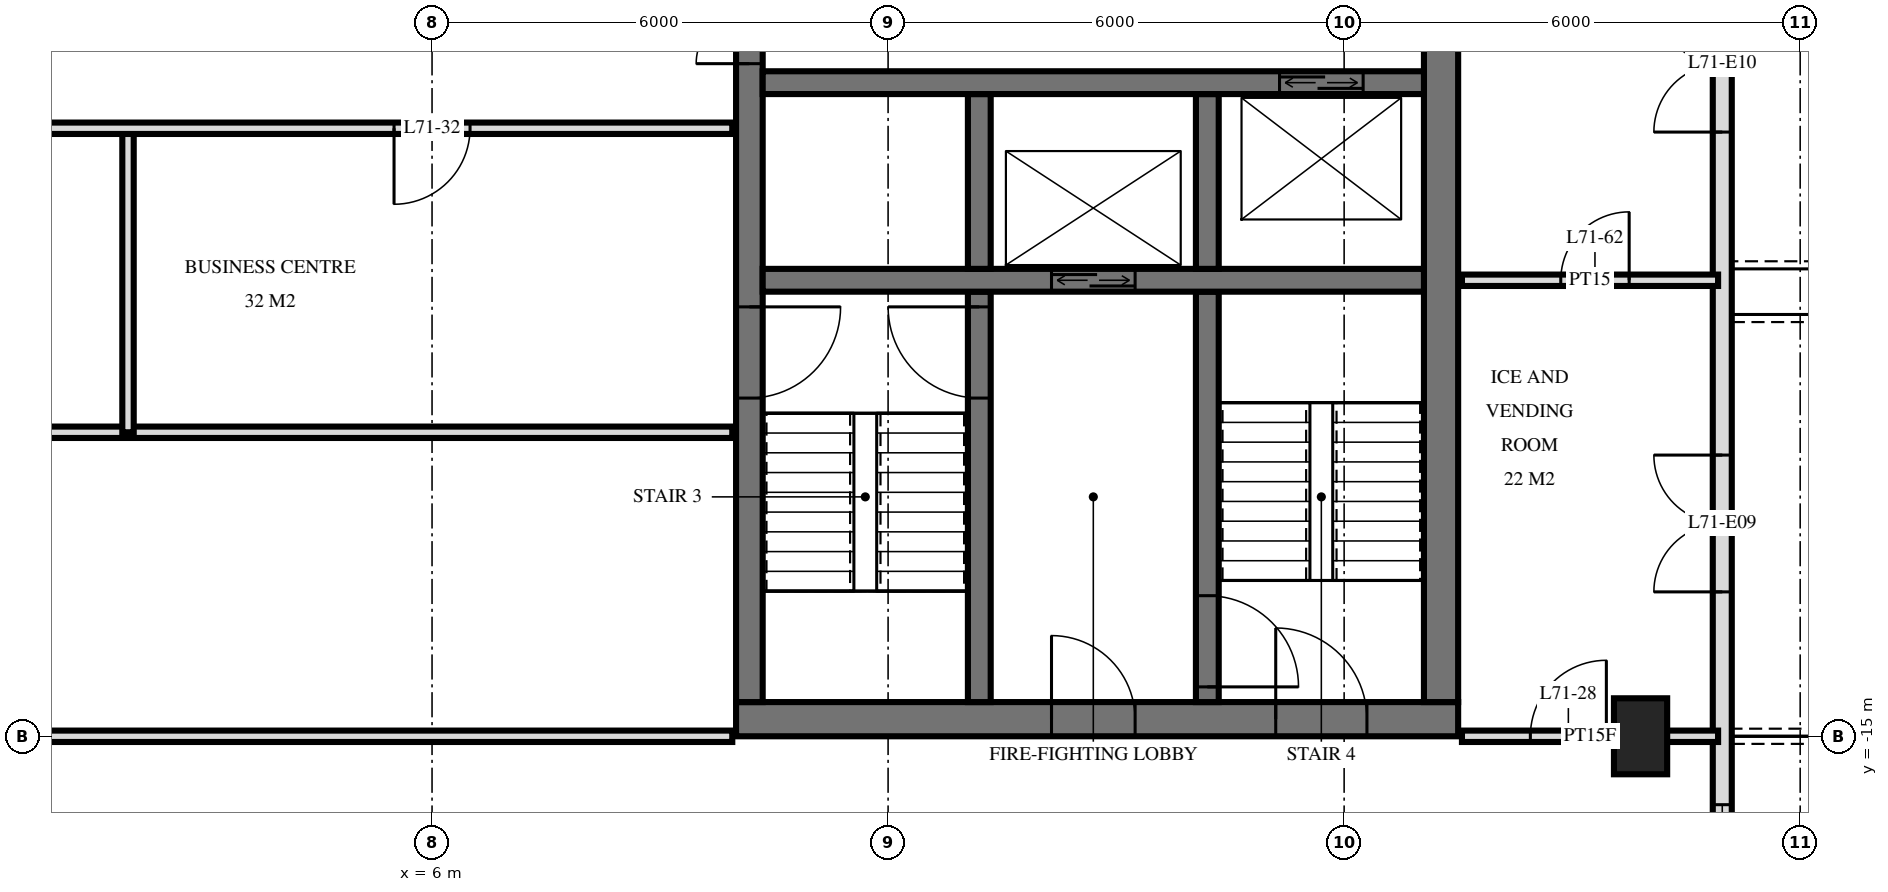
"""IFC4 building model, lengths in metres.
Left out: names, types, materials, properties, quantities, classifications, styles, units other than length and angle.
Written with IfcOpenShell. Run it as: python <this file> out.ifc"""

import sys

from ifc_helpers import new_model, si_unit, direction, frame, frame_2d, origin, origin_2d, place, context, subcontext, project, spatial, rectangle, extrude, element, fill, save


model = new_model("IFC4")
c1 = context("Model", 3, precision=1e-05, world=origin(), true_north=direction((0.0, 1.0)))
c2 = subcontext(c1, "Body", "Model", "MODEL_VIEW")
j1 = project(units=[si_unit("LENGTHUNIT", "METRE"), si_unit("PLANEANGLEUNIT", "RADIAN")], contexts=[c1])
p1 = place(None, origin())
s1 = spatial("IfcSite", under=j1, at=p1, CompositionType="ELEMENT")
p2 = place(p1, origin())
s2 = spatial("IfcBuilding", under=s1, at=p2, CompositionType="ELEMENT")
p3 = place(p2, frame((0.0, 0.0, 270.1)))
s3 = spatial("IfcBuildingStorey", under=s2, at=p3, CompositionType="ELEMENT", Elevation=270.1)
p4 = place(p3, frame((21.9, -15.0, 0.0), z_axis=(0.0, 0.0, 1.0), x_axis=(0.0, 1.0, 0.0)))
e1 = element("IfcColumn", 1, at=p4, inside=s3, PredefinedType="COLUMN", context=c2, shape_type="SweptSolid", body=[
    extrude(rectangle(XDim=1.0, YDim=0.7, at=origin_2d()), origin(), (0.0, 0.0, 1.0), 3.5),
])
p5 = place(p3, frame((10.0, -14.775, 0.0), z_axis=(0.0, 0.0, 1.0), x_axis=(1.0, 0.0, 0.0)))
e2 = element("IfcWall", 2, at=p5, inside=s3, PredefinedType="SHEAR", context=c2, shape_type="SweptSolid", body=[
    extrude(rectangle(XDim=9.5, YDim=0.45, at=frame_2d((4.75, 0.0))), origin(), (0.0, 0.0, 1.0), 3.5),
])
p6 = place(p5, frame((7.1, 0.0, 0.0)))
e3 = element("IfcOpeningElement", 3, at=p6, cuts=e2, PredefinedType="OPENING", context=c2, shape_type="SweptSolid", body=[
    extrude(rectangle(XDim=1.2, YDim=2.1, at=frame_2d((0.6, 1.05))), frame((0.0, 0.235, 0.0), z_axis=(0.0, -1.0, 0.0), x_axis=(1.0, 0.0, 0.0)), (0.0, 0.0, 1.0), 0.47),
])
p7 = place(p5, frame((4.15, 0.0, 0.0)))
e4 = element("IfcOpeningElement", 4, at=p7, cuts=e2, PredefinedType="OPENING", context=c2, shape_type="SweptSolid", body=[
    extrude(rectangle(XDim=1.1, YDim=2.1, at=frame_2d((0.55, 1.05))), frame((0.0, 0.235, 0.0), z_axis=(0.0, -1.0, 0.0), x_axis=(1.0, 0.0, 0.0)), (0.0, 0.0, 1.0), 0.47),
])
p8 = place(p3, frame((10.175, -14.55, 0.0), z_axis=(0.0, 0.0, 1.0), x_axis=(0.0, 1.0, 0.0)))
e5 = element("IfcWall", 5, at=p8, inside=s3, PredefinedType="SHEAR", context=c2, shape_type="SweptSolid", body=[
    extrude(rectangle(XDim=14.1, YDim=0.35, at=frame_2d((7.05, 0.0))), origin(), (0.0, 0.0, 1.0), 3.5),
])
p9 = place(p8, frame((8.4, 0.0, 0.0)))
e6 = element("IfcOpeningElement", 6, at=p9, cuts=e5, PredefinedType="OPENING", context=c2, shape_type="SweptSolid", body=[
    extrude(rectangle(XDim=1.4, YDim=2.4, at=frame_2d((0.7, 1.2))), frame((0.0, 0.185, 0.0), z_axis=(0.0, -1.0, 0.0), x_axis=(1.0, 0.0, 0.0)), (0.0, 0.0, 1.0), 0.37),
])
p10 = place(p8, frame((10.0, 0.0, 0.0)))
e7 = element("IfcOpeningElement", 7, at=p10, cuts=e5, PredefinedType="OPENING", context=c2, shape_type="SweptSolid", body=[
    extrude(rectangle(XDim=1.4, YDim=2.4, at=frame_2d((0.7, 1.2))), frame((0.0, 0.185, 0.0), z_axis=(0.0, -1.0, 0.0), x_axis=(1.0, 0.0, 0.0)), (0.0, 0.0, 1.0), 0.37),
])
p11 = place(p8, frame((4.0, 0.0, 0.0)))
e8 = element("IfcOpeningElement", 8, at=p11, cuts=e5, PredefinedType="OPENING", context=c2, shape_type="SweptSolid", body=[
    extrude(rectangle(XDim=1.2, YDim=2.1, at=frame_2d((0.6, 1.05))), frame((0.0, 0.185, 0.0), z_axis=(0.0, -1.0, 0.0), x_axis=(1.0, 0.0, 0.0)), (0.0, 0.0, 1.0), 0.37),
])
p12 = place(p3, frame((19.275, -14.55, 0.0), z_axis=(0.0, 0.0, 1.0), x_axis=(0.0, 1.0, 0.0)))
e9 = element("IfcWall", 9, at=p12, inside=s3, PredefinedType="SHEAR", context=c2, shape_type="SweptSolid", body=[
    extrude(rectangle(XDim=14.1, YDim=0.45, at=frame_2d((7.05, 0.0))), origin(), (0.0, 0.0, 1.0), 3.5),
])
p13 = place(p3, frame((10.35, -6.4, 0.0), z_axis=(0.0, 0.0, 1.0), x_axis=(1.0, 0.0, 0.0)))
e10 = element("IfcWall", 10, at=p13, inside=s3, PredefinedType="SHEAR", context=c2, shape_type="SweptSolid", body=[
    extrude(rectangle(XDim=8.7, YDim=0.3, at=frame_2d((4.35, 0.0))), origin(), (0.0, 0.0, 1.0), 3.5),
])
p14 = place(p13, frame((6.8, 0.0, 0.0)))
e11 = element("IfcOpeningElement", 11, at=p14, cuts=e10, PredefinedType="OPENING", context=c2, shape_type="SweptSolid", body=[
    extrude(rectangle(XDim=1.1, YDim=2.1, at=frame_2d((0.55, 1.05))), frame((0.0, 0.16, 0.0), z_axis=(0.0, -1.0, 0.0), x_axis=(1.0, 0.0, 0.0)), (0.0, 0.0, 1.0), 0.32),
])
p15 = place(p3, frame((10.35, -9.0, 0.0), z_axis=(0.0, 0.0, 1.0), x_axis=(1.0, 0.0, 0.0)))
e12 = element("IfcWall", 12, at=p15, inside=s3, PredefinedType="SHEAR", context=c2, shape_type="SweptSolid", body=[
    extrude(rectangle(XDim=8.7, YDim=0.3, at=frame_2d((4.35, 0.0))), origin(), (0.0, 0.0, 1.0), 3.5),
])
p16 = place(p15, frame((3.8, 0.0, 0.0)))
e13 = element("IfcOpeningElement", 13, at=p16, cuts=e12, PredefinedType="OPENING", context=c2, shape_type="SweptSolid", body=[
    extrude(rectangle(XDim=1.1, YDim=2.1, at=frame_2d((0.55, 1.05))), frame((0.0, 0.16, 0.0), z_axis=(0.0, -1.0, 0.0), x_axis=(1.0, 0.0, 0.0)), (0.0, 0.0, 1.0), 0.32),
])
p17 = place(p3, frame((13.2, -8.85, 0.0), z_axis=(0.0, 0.0, 1.0), x_axis=(0.0, 1.0, 0.0)))
e14 = element("IfcWall", 14, at=p17, inside=s3, PredefinedType="SHEAR", context=c2, shape_type="SweptSolid", body=[
    extrude(rectangle(XDim=2.3, YDim=0.3, at=frame_2d((1.15, 0.0))), origin(), (0.0, 0.0, 1.0), 3.5),
])
p18 = place(p3, frame((13.2, -14.55, 0.0), z_axis=(0.0, 0.0, 1.0), x_axis=(0.0, 1.0, 0.0)))
e15 = element("IfcWall", 15, at=p18, inside=s3, PredefinedType="SHEAR", context=c2, shape_type="SweptSolid", body=[
    extrude(rectangle(XDim=5.4, YDim=0.3, at=frame_2d((2.7, 0.0))), origin(), (0.0, 0.0, 1.0), 3.5),
])
p19 = place(p18, frame((4.0, 0.0, 0.0)))
e16 = element("IfcOpeningElement", 16, at=p19, cuts=e15, PredefinedType="OPENING", context=c2, shape_type="SweptSolid", body=[
    extrude(rectangle(XDim=1.2, YDim=2.1, at=frame_2d((0.6, 1.05))), frame((0.0, 0.16, 0.0), z_axis=(0.0, -1.0, 0.0), x_axis=(1.0, 0.0, 0.0)), (0.0, 0.0, 1.0), 0.32),
])
p20 = place(p3, frame((16.2, -8.85, 0.0), z_axis=(0.0, 0.0, 1.0), x_axis=(0.0, 1.0, 0.0)))
e17 = element("IfcWall", 17, at=p20, inside=s3, PredefinedType="SHEAR", context=c2, shape_type="SweptSolid", body=[
    extrude(rectangle(XDim=2.3, YDim=0.3, at=frame_2d((1.15, 0.0))), origin(), (0.0, 0.0, 1.0), 3.5),
])
p21 = place(p3, frame((16.2, -14.55, 0.0), z_axis=(0.0, 0.0, 1.0), x_axis=(0.0, 1.0, 0.0)))
e18 = element("IfcWall", 18, at=p21, inside=s3, PredefinedType="SHEAR", context=c2, shape_type="SweptSolid", body=[
    extrude(rectangle(XDim=5.4, YDim=0.3, at=frame_2d((2.7, 0.0))), origin(), (0.0, 0.0, 1.0), 3.5),
])
p22 = place(p21, frame((0.2, 0.0, 0.0)))
e19 = element("IfcOpeningElement", 19, at=p22, cuts=e18, PredefinedType="OPENING", context=c2, shape_type="SweptSolid", body=[
    extrude(rectangle(XDim=1.2, YDim=2.1, at=frame_2d((0.6, 1.05))), frame((0.0, 0.16, 0.0), z_axis=(0.0, -1.0, 0.0), x_axis=(1.0, 0.0, 0.0)), (0.0, 0.0, 1.0), 0.32),
])
p23 = place(p3, frame((22.975, -29.275, 0.0), z_axis=(0.0, 0.0, 1.0), x_axis=(0.0, 1.0, 0.0)))
e20 = element("IfcWall", 20, at=p23, inside=s3, PredefinedType="SOLIDWALL", context=c2, shape_type="SweptSolid", body=[
    extrude(rectangle(XDim=25.951, YDim=0.25, at=frame_2d((12.975, 0.0))), origin(), (0.0, 0.0, 1.0), 3.22),
])
p24 = place(p23, frame((0.575, 0.0, 0.0)))
e21 = element("IfcOpeningElement", 21, at=p24, cuts=e20, PredefinedType="OPENING", context=c2, shape_type="SweptSolid", body=[
    extrude(rectangle(XDim=1.8, YDim=2.4, at=frame_2d((0.9, 1.2))), frame((0.0, 0.135, 0.0), z_axis=(0.0, -1.0, 0.0), x_axis=(1.0, 0.0, 0.0)), (0.0, 0.0, 1.0), 0.27),
])
p25 = place(p23, frame((3.325, 0.0, 0.9)))
e22 = element("IfcOpeningElement", 22, at=p25, cuts=e20, PredefinedType="OPENING", context=c2, shape_type="SweptSolid", body=[
    extrude(rectangle(XDim=1.8, YDim=1.5, at=frame_2d((0.9, 0.75))), frame((0.0, 0.135, 0.0), z_axis=(0.0, -1.0, 0.0), x_axis=(1.0, 0.0, 0.0)), (0.0, 0.0, 1.0), 0.27),
])
p26 = place(p23, frame((8.375, 0.0, 0.0)))
e23 = element("IfcOpeningElement", 23, at=p26, cuts=e20, PredefinedType="OPENING", context=c2, shape_type="SweptSolid", body=[
    extrude(rectangle(XDim=1.8, YDim=2.4, at=frame_2d((0.9, 1.2))), frame((0.0, 0.135, 0.0), z_axis=(0.0, -1.0, 0.0), x_axis=(1.0, 0.0, 0.0)), (0.0, 0.0, 1.0), 0.27),
])
p27 = place(p23, frame((12.175, 0.0, 0.9)))
e24 = element("IfcOpeningElement", 24, at=p27, cuts=e20, PredefinedType="OPENING", context=c2, shape_type="SweptSolid", body=[
    extrude(rectangle(XDim=1.2, YDim=1.5, at=frame_2d((0.6, 0.75))), frame((0.0, 0.135, 0.0), z_axis=(0.0, -1.0, 0.0), x_axis=(1.0, 0.0, 0.0)), (0.0, 0.0, 1.0), 0.27),
])
p28 = place(p23, frame((16.175, 0.0, 0.0)))
e25 = element("IfcOpeningElement", 25, at=p28, cuts=e20, PredefinedType="OPENING", context=c2, shape_type="SweptSolid", body=[
    extrude(rectangle(XDim=1.8, YDim=2.4, at=frame_2d((0.9, 1.2))), frame((0.0, 0.135, 0.0), z_axis=(0.0, -1.0, 0.0), x_axis=(1.0, 0.0, 0.0)), (0.0, 0.0, 1.0), 0.27),
])
p29 = place(p23, frame((22.225, 0.0, 0.0)))
e26 = element("IfcOpeningElement", 26, at=p29, cuts=e20, PredefinedType="OPENING", context=c2, shape_type="SweptSolid", body=[
    extrude(rectangle(XDim=1.8, YDim=2.4, at=frame_2d((0.9, 1.2))), frame((0.0, 0.135, 0.0), z_axis=(0.0, -1.0, 0.0), x_axis=(1.0, 0.0, 0.0)), (0.0, 0.0, 1.0), 0.27),
])
p30 = place(p3, frame((2.0, -11.0, 0.0), z_axis=(0.0, 0.0, 1.0), x_axis=(0.0, 1.0, 0.0)))
e27 = element("IfcWall", 27, at=p30, inside=s3, PredefinedType="PARTITIONING", context=c2, shape_type="SweptSolid", body=[
    extrude(rectangle(XDim=4.0, YDim=0.15, at=frame_2d((2.0, 0.0))), origin(), (0.0, 0.0, 1.0), 3.22),
])
p31 = place(p3, frame((-9.95, -15.0, 0.0), z_axis=(0.0, 0.0, 1.0), x_axis=(1.0, 0.0, 0.0)))
e28 = element("IfcWall", 28, at=p31, inside=s3, PredefinedType="PARTITIONING", context=c2, shape_type="SweptSolid", body=[
    extrude(rectangle(XDim=19.9, YDim=0.15, at=frame_2d((9.95, 0.0))), origin(), (0.0, 0.0, 1.0), 2.584),
])
p32 = place(p31, frame((9.45, 0.0, 0.0)))
e29 = element("IfcOpeningElement", 29, at=p32, cuts=e28, PredefinedType="OPENING", context=c2, shape_type="SweptSolid", body=[
    extrude(rectangle(XDim=1.0, YDim=2.1, at=frame_2d((0.5, 1.05))), frame((0.0, 0.085, 0.0), z_axis=(0.0, -1.0, 0.0), x_axis=(1.0, 0.0, 0.0)), (0.0, 0.0, 1.0), 0.17),
])
p33 = place(p3, frame((19.55, -15.0, 0.0), z_axis=(0.0, 0.0, 1.0), x_axis=(1.0, 0.0, 0.0)))
e30 = element("IfcWall", 30, at=p33, inside=s3, PredefinedType="PARTITIONING", context=c2, shape_type="SweptSolid", body=[
    extrude(rectangle(XDim=3.37, YDim=0.15, at=frame_2d((1.685, 0.0))), origin(), (0.0, 0.0, 1.0), 3.22),
])
p34 = place(p33, frame((0.9, 0.0, 0.0)))
e31 = element("IfcOpeningElement", 31, at=p34, cuts=e30, PredefinedType="OPENING", context=c2, shape_type="SweptSolid", body=[
    extrude(rectangle(XDim=1.0, YDim=2.1, at=frame_2d((0.5, 1.05))), frame((0.0, 0.085, 0.0), z_axis=(0.0, -1.0, 0.0), x_axis=(1.0, 0.0, 0.0)), (0.0, 0.0, 1.0), 0.17),
])
p35 = place(p3, frame((-9.95, -11.0, 0.0), z_axis=(0.0, 0.0, 1.0), x_axis=(1.0, 0.0, 0.0)))
e32 = element("IfcWall", 32, at=p35, inside=s3, PredefinedType="PARTITIONING", context=c2, shape_type="SweptSolid", body=[
    extrude(rectangle(XDim=19.9, YDim=0.15, at=frame_2d((9.95, 0.0))), origin(), (0.0, 0.0, 1.0), 3.22),
])
p36 = place(p35, frame((9.45, 0.0, 0.0)))
e33 = element("IfcOpeningElement", 33, at=p36, cuts=e32, PredefinedType="OPENING", context=c2, shape_type="SweptSolid", body=[
    extrude(rectangle(XDim=1.0, YDim=2.1, at=frame_2d((0.5, 1.05))), frame((0.0, 0.085, 0.0), z_axis=(0.0, -1.0, 0.0), x_axis=(1.0, 0.0, 0.0)), (0.0, 0.0, 1.0), 0.17),
])
p37 = place(p35, frame((3.45, 0.0, 0.0)))
e34 = element("IfcOpeningElement", 34, at=p37, cuts=e32, PredefinedType="OPENING", context=c2, shape_type="SweptSolid", body=[
    extrude(rectangle(XDim=1.0, YDim=2.1, at=frame_2d((0.5, 1.05))), frame((0.0, 0.085, 0.0), z_axis=(0.0, -1.0, 0.0), x_axis=(1.0, 0.0, 0.0)), (0.0, 0.0, 1.0), 0.17),
])
p38 = place(p3, frame((19.55, -9.0, 0.0), z_axis=(0.0, 0.0, 1.0), x_axis=(1.0, 0.0, 0.0)))
e35 = element("IfcWall", 35, at=p38, inside=s3, PredefinedType="PARTITIONING", context=c2, shape_type="SweptSolid", body=[
    extrude(rectangle(XDim=3.37, YDim=0.15, at=frame_2d((1.685, 0.0))), origin(), (0.0, 0.0, 1.0), 3.22),
])
p39 = place(p38, frame((1.3, 0.0, 0.0)))
e36 = element("IfcOpeningElement", 36, at=p39, cuts=e35, PredefinedType="OPENING", context=c2, shape_type="SweptSolid", body=[
    extrude(rectangle(XDim=0.9, YDim=2.1, at=frame_2d((0.45, 1.05))), frame((0.0, 0.085, 0.0), z_axis=(0.0, -1.0, 0.0), x_axis=(1.0, 0.0, 0.0)), (0.0, 0.0, 1.0), 0.17),
])
p40 = place(p3, frame((-9.95, -7.0, 0.0), z_axis=(0.0, 0.0, 1.0), x_axis=(1.0, 0.0, 0.0)))
e37 = element("IfcWall", 37, at=p40, inside=s3, PredefinedType="PARTITIONING", context=c2, shape_type="SweptSolid", body=[
    extrude(rectangle(XDim=19.9, YDim=0.15, at=frame_2d((9.95, 0.0))), origin(), (0.0, 0.0, 1.0), 3.22),
])
p41 = place(p40, frame((9.45, 0.0, 0.0)))
e38 = element("IfcOpeningElement", 38, at=p41, cuts=e37, PredefinedType="OPENING", context=c2, shape_type="SweptSolid", body=[
    extrude(rectangle(XDim=1.0, YDim=2.1, at=frame_2d((0.5, 1.05))), frame((0.0, 0.085, 0.0), z_axis=(0.0, -1.0, 0.0), x_axis=(1.0, 0.0, 0.0)), (0.0, 0.0, 1.0), 0.17),
])
p42 = place(p40, frame((15.45, 0.0, 0.0)))
e39 = element("IfcOpeningElement", 39, at=p42, cuts=e37, PredefinedType="OPENING", context=c2, shape_type="SweptSolid", body=[
    extrude(rectangle(XDim=1.0, YDim=2.1, at=frame_2d((0.5, 1.05))), frame((0.0, 0.085, 0.0), z_axis=(0.0, -1.0, 0.0), x_axis=(1.0, 0.0, 0.0)), (0.0, 0.0, 1.0), 0.17),
])
p43 = place(p27, origin())
e40 = element("IfcWindow", 40, at=p43, inside=s3, PartitioningType="SINGLE_PANEL", PredefinedType="WINDOW", context=c2, shape_type="SweptSolid", body=[
    extrude(rectangle(XDim=1.2, YDim=1.5, at=frame_2d((0.6, 0.75))), frame((0.0, 0.03, 0.0), z_axis=(0.0, -1.0, 0.0), x_axis=(1.0, 0.0, 0.0)), (0.0, 0.0, 1.0), 0.06),
])
fill(e24, e40)
p44 = place(p28, origin())
e41 = element("IfcDoor", 41, at=p44, inside=s3, OperationType="DOUBLE_DOOR_SINGLE_SWING", PredefinedType="DOOR", context=c2, shape_type="SweptSolid", body=[
    extrude(rectangle(XDim=1.8, YDim=2.4, at=frame_2d((0.9, 1.2))), frame((0.0, 0.025, 0.0), z_axis=(0.0, -1.0, 0.0), x_axis=(1.0, 0.0, 0.0)), (0.0, 0.0, 1.0), 0.05),
])
fill(e25, e41)
p45 = place(p29, origin())
e42 = element("IfcDoor", 42, at=p45, inside=s3, OperationType="DOUBLE_DOOR_SINGLE_SWING", PredefinedType="DOOR", context=c2, shape_type="SweptSolid", body=[
    extrude(rectangle(XDim=1.8, YDim=2.4, at=frame_2d((0.9, 1.2))), frame((0.0, 0.025, 0.0), z_axis=(0.0, -1.0, 0.0), x_axis=(1.0, 0.0, 0.0)), (0.0, 0.0, 1.0), 0.05),
])
fill(e26, e42)
p46 = place(p16, origin())
e43 = element("IfcDoor", 43, at=p46, inside=s3, OperationType="DOUBLE_DOOR_SLIDING", PredefinedType="USERDEFINED", context=c2, shape_type="SweptSolid", body=[
    extrude(rectangle(XDim=1.1, YDim=2.1, at=frame_2d((0.55, 1.05))), frame((0.0, 0.025, 0.0), z_axis=(0.0, -1.0, 0.0), x_axis=(1.0, 0.0, 0.0)), (0.0, 0.0, 1.0), 0.05),
])
fill(e13, e43)
p47 = place(p14, origin())
e44 = element("IfcDoor", 44, at=p47, inside=s3, OperationType="DOUBLE_DOOR_SLIDING", PredefinedType="USERDEFINED", context=c2, shape_type="SweptSolid", body=[
    extrude(rectangle(XDim=1.1, YDim=2.1, at=frame_2d((0.55, 1.05))), frame((0.0, 0.025, 0.0), z_axis=(0.0, -1.0, 0.0), x_axis=(1.0, 0.0, 0.0)), (0.0, 0.0, 1.0), 0.05),
])
fill(e11, e44)
p48 = place(p9, origin())
e45 = element("IfcDoor", 45, at=p48, inside=s3, OperationType="DOUBLE_DOOR_SINGLE_SWING", PredefinedType="DOOR", context=c2, shape_type="SweptSolid", body=[
    extrude(rectangle(XDim=1.4, YDim=2.4, at=frame_2d((0.7, 1.2))), frame((0.0, 0.025, 0.0), z_axis=(0.0, -1.0, 0.0), x_axis=(1.0, 0.0, 0.0)), (0.0, 0.0, 1.0), 0.05),
])
fill(e6, e45)
p49 = place(p11, frame((0.6, 0.0, 0.0), z_axis=(0.0, 0.0, 1.0), x_axis=(-1.0, 0.0, 0.0)))
e46 = element("IfcDoor", 46, at=p49, inside=s3, OperationType="SINGLE_SWING_RIGHT", PredefinedType="DOOR", context=c2, shape_type="SweptSolid", body=[
    extrude(rectangle(XDim=1.2, YDim=2.1, at=frame_2d((0.0, 1.05))), frame((0.0, -0.025, 0.0), z_axis=(0.0, 1.0, 0.0), x_axis=(-1.0, 0.0, 0.0)), (0.0, 0.0, 1.0), 0.05),
])
fill(e8, e46)
p50 = place(p6, origin())
e47 = element("IfcDoor", 47, at=p50, inside=s3, OperationType="SINGLE_SWING_RIGHT", PredefinedType="DOOR", context=c2, shape_type="SweptSolid", body=[
    extrude(rectangle(XDim=1.2, YDim=2.1, at=frame_2d((0.6, 1.05))), frame((0.0, 0.025, 0.0), z_axis=(0.0, -1.0, 0.0), x_axis=(1.0, 0.0, 0.0)), (0.0, 0.0, 1.0), 0.05),
])
fill(e3, e47)
p51 = place(p7, origin())
e48 = element("IfcDoor", 48, at=p51, inside=s3, OperationType="SINGLE_SWING_RIGHT", PredefinedType="DOOR", context=c2, shape_type="SweptSolid", body=[
    extrude(rectangle(XDim=1.1, YDim=2.1, at=frame_2d((0.55, 1.05))), frame((0.0, 0.025, 0.0), z_axis=(0.0, -1.0, 0.0), x_axis=(1.0, 0.0, 0.0)), (0.0, 0.0, 1.0), 0.05),
])
fill(e4, e48)
p52 = place(p19, origin())
e49 = element("IfcDoor", 49, at=p52, inside=s3, OperationType="SINGLE_SWING_LEFT", PredefinedType="DOOR", context=c2, shape_type="SweptSolid", body=[
    extrude(rectangle(XDim=1.2, YDim=2.1, at=frame_2d((0.6, 1.05))), frame((0.0, 0.025, 0.0), z_axis=(0.0, -1.0, 0.0), x_axis=(1.0, 0.0, 0.0)), (0.0, 0.0, 1.0), 0.05),
])
fill(e16, e49)
p53 = place(p22, frame((0.6, 0.0, 0.0), z_axis=(0.0, 0.0, 1.0), x_axis=(-1.0, 0.0, 0.0)))
e50 = element("IfcDoor", 50, at=p53, inside=s3, OperationType="SINGLE_SWING_LEFT", PredefinedType="DOOR", context=c2, shape_type="SweptSolid", body=[
    extrude(rectangle(XDim=1.2, YDim=2.1, at=frame_2d((0.0, 1.05))), frame((0.0, -0.025, 0.0), z_axis=(0.0, 1.0, 0.0), x_axis=(-1.0, 0.0, 0.0)), (0.0, 0.0, 1.0), 0.05),
])
fill(e19, e50)
p54 = place(p34, origin())
e51 = element("IfcDoor", 51, at=p54, inside=s3, OperationType="SINGLE_SWING_LEFT", PredefinedType="DOOR", context=c2, shape_type="SweptSolid", body=[
    extrude(rectangle(XDim=1.0, YDim=2.1, at=frame_2d((0.5, 1.05))), frame((0.0, 0.025, 0.0), z_axis=(0.0, -1.0, 0.0), x_axis=(1.0, 0.0, 0.0)), (0.0, 0.0, 1.0), 0.05),
])
fill(e31, e51)
p55 = place(p42, frame((0.5, 0.0, 0.0), z_axis=(0.0, 0.0, 1.0), x_axis=(-1.0, 0.0, 0.0)))
e52 = element("IfcDoor", 52, at=p55, inside=s3, OperationType="SINGLE_SWING_LEFT", PredefinedType="DOOR", context=c2, shape_type="SweptSolid", body=[
    extrude(rectangle(XDim=1.0, YDim=2.1, at=frame_2d((0.0, 1.05))), frame((0.0, -0.025, 0.0), z_axis=(0.0, 1.0, 0.0), x_axis=(-1.0, 0.0, 0.0)), (0.0, 0.0, 1.0), 0.05),
])
fill(e39, e52)
p56 = place(p39, origin())
e53 = element("IfcDoor", 53, at=p56, inside=s3, OperationType="SINGLE_SWING_LEFT", PredefinedType="DOOR", context=c2, shape_type="SweptSolid", body=[
    extrude(rectangle(XDim=0.9, YDim=2.1, at=frame_2d((0.45, 1.05))), frame((0.0, 0.025, 0.0), z_axis=(0.0, -1.0, 0.0), x_axis=(1.0, 0.0, 0.0)), (0.0, 0.0, 1.0), 0.05),
])
fill(e36, e53)
save(model, sys.argv[1])
